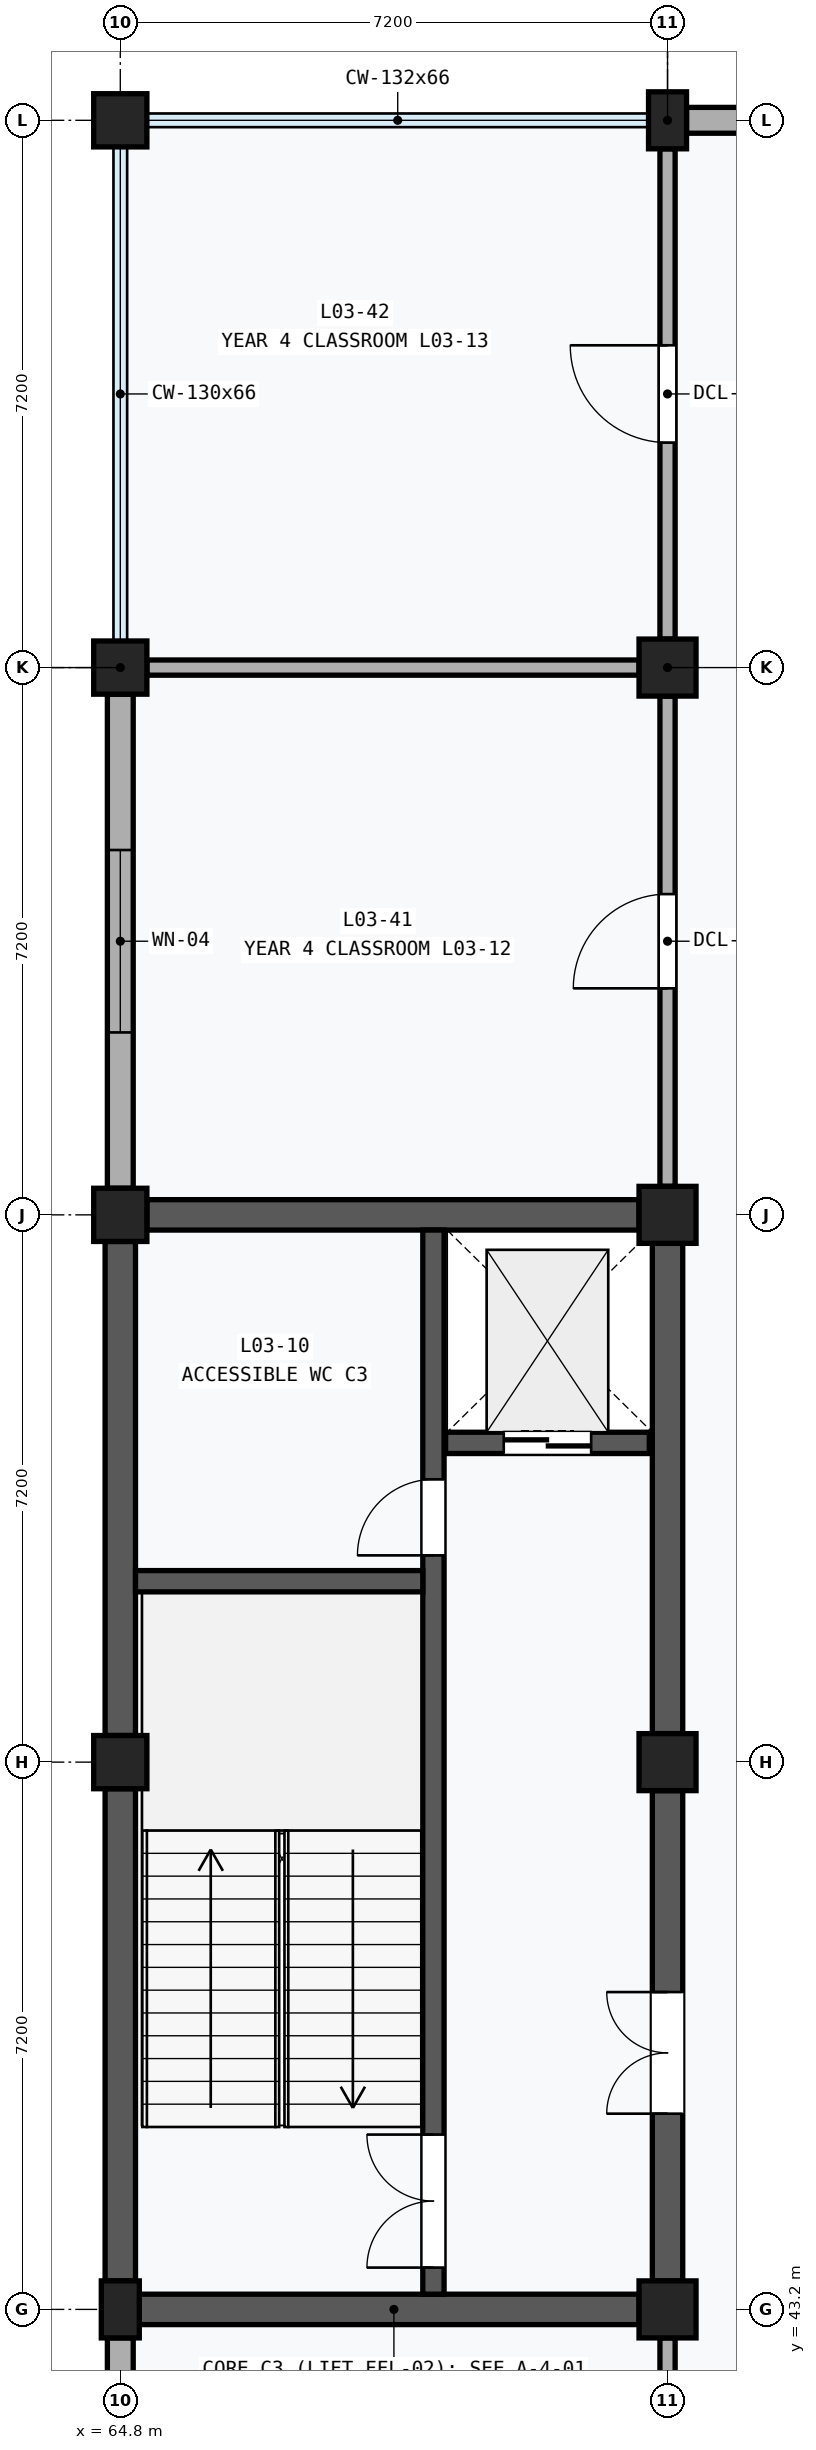
"""IFC4 building model, lengths in metres.
Left out: names, types, materials, properties, quantities, classifications, styles, units other than length and angle.
Written with IfcOpenShell. Run it as: python <this file> out.ifc"""

import sys

from ifc_helpers import new_model, si_unit, direction, frame, frame_2d, origin, origin_2d, place, context, subcontext, project, spatial, rectangle, extrude, element, fill, save


model = new_model("IFC4")
c1 = context("Model", 3, precision=1e-05, world=origin(), true_north=direction((0.0, 1.0)))
c2 = subcontext(c1, "Body", "Model", "MODEL_VIEW")
j1 = project(units=[si_unit("LENGTHUNIT", "METRE"), si_unit("PLANEANGLEUNIT", "RADIAN")], contexts=[c1])
p1 = place(None, origin())
s1 = spatial("IfcSite", under=j1, at=p1, CompositionType="ELEMENT")
p2 = place(p1, origin())
s2 = spatial("IfcBuilding", under=s1, at=p2, CompositionType="ELEMENT")
p3 = place(p2, frame((0.0, 0.0, 14.4)))
s3 = spatial("IfcBuildingStorey", under=s2, at=p3, CompositionType="ELEMENT", Elevation=14.4)
p4 = place(p3, frame((64.8, 43.2, 0.0), z_axis=(0.0, 0.0, 1.0), x_axis=(1.0, 0.0, 0.0)))
e1 = element("IfcColumn", 1, at=p4, inside=s3, PredefinedType="PILASTER", context=c2, shape_type="SweptSolid", body=[
    extrude(rectangle(XDim=0.5, YDim=0.75, at=origin_2d()), origin(), (0.0, 0.0, 1.0), 4.2),
])
for number, where, z_axis, x_axis in (
    (2, (64.8, 50.4, 0.0), (0.0, 0.0, 1.0), (1.0, 0.0, 0.0)),
    (3, (64.8, 57.6, 0.0), (0.0, 0.0, 1.0), (1.0, 0.0, 0.0)),
    (4, (64.8, 64.8, 0.0), (0.0, 0.0, 1.0), (1.0, 0.0, 0.0)),
    (5, (64.8, 72.0, 0.0), (0.0, 0.0, 1.0), (1.0, 0.0, 0.0)),
):
    element("IfcColumn", number, at=place(p3, frame(where, z_axis=z_axis, x_axis=x_axis)), inside=s3, PredefinedType="COLUMN", context=c2, shape_type="SweptSolid", body=[
        extrude(rectangle(XDim=0.7, YDim=0.7, at=origin_2d()), origin(), (0.0, 0.0, 1.0), 4.2),
    ])
for number, where, z_axis, x_axis in (
    (6, (72.0, 43.2, 0.0), (0.0, 0.0, 1.0), (1.0, 0.0, 0.0)),
    (7, (72.0, 50.4, 0.0), (0.0, 0.0, 1.0), (1.0, 0.0, 0.0)),
    (8, (72.0, 57.6, 0.0), (0.0, 0.0, 1.0), (1.0, 0.0, 0.0)),
    (9, (72.0, 64.8, 0.0), (0.0, 0.0, 1.0), (1.0, 0.0, 0.0)),
):
    element("IfcColumn", number, at=place(p3, frame(where, z_axis=z_axis, x_axis=x_axis)), inside=s3, PredefinedType="COLUMN", context=c2, shape_type="SweptSolid", body=[
        extrude(rectangle(XDim=0.75, YDim=0.75, at=origin_2d()), origin(), (0.0, 0.0, 1.0), 4.2),
    ])
p5 = place(p3, frame((72.0, 72.0, 0.0), z_axis=(0.0, 0.0, 1.0), x_axis=(1.0, 0.0, 0.0)))
e10 = element("IfcColumn", 10, at=p5, inside=s3, PredefinedType="PILASTER", context=c2, shape_type="SweptSolid", body=[
    extrude(rectangle(XDim=0.5, YDim=0.75, at=origin_2d()), origin(), (0.0, 0.0, 1.0), 4.2),
])
p6 = place(p3, frame((64.8, 36.35, 0.0), z_axis=(0.0, 0.0, 1.0), x_axis=(0.0, 1.0, 0.0)))
e11 = element("IfcWall", 11, at=p6, inside=s3, PredefinedType="SOLIDWALL", context=c2, shape_type="SweptSolid", body=[
    extrude(rectangle(XDim=6.475, YDim=0.34, at=frame_2d((3.237, 0.0))), origin(), (0.0, 0.0, 1.0), 3.31),
])
p7 = place(p6, frame((2.337, 0.0, 0.9)))
e12 = element("IfcOpeningElement", 12, at=p7, cuts=e11, PredefinedType="OPENING", context=c2, shape_type="SweptSolid", body=[
    extrude(rectangle(XDim=1.8, YDim=1.8, at=frame_2d((0.9, 0.9))), frame((0.0, 0.182, 0.0), z_axis=(0.0, -1.0, 0.0), x_axis=(1.0, 0.0, 0.0)), (0.0, 0.0, 1.0), 0.364),
])
p8 = place(p3, frame((64.8, 57.95, 0.0), z_axis=(0.0, 0.0, 1.0), x_axis=(0.0, 1.0, 0.0)))
e13 = element("IfcWall", 13, at=p8, inside=s3, PredefinedType="SOLIDWALL", context=c2, shape_type="SweptSolid", body=[
    extrude(rectangle(XDim=6.5, YDim=0.34, at=frame_2d((3.25, 0.0))), origin(), (0.0, 0.0, 1.0), 3.31),
])
p9 = place(p8, frame((2.05, 0.0, 0.9)))
e14 = element("IfcOpeningElement", 14, at=p9, cuts=e13, PredefinedType="OPENING", context=c2, shape_type="SweptSolid", body=[
    extrude(rectangle(XDim=2.4, YDim=1.8, at=frame_2d((1.2, 0.9))), frame((0.0, 0.182, 0.0), z_axis=(0.0, -1.0, 0.0), x_axis=(1.0, 0.0, 0.0)), (0.0, 0.0, 1.0), 0.364),
])
p10 = place(p3, frame((72.25, 72.0, 0.0), z_axis=(0.0, 0.0, 1.0), x_axis=(1.0, 0.0, 0.0)))
e15 = element("IfcWall", 15, at=p10, inside=s3, PredefinedType="SOLIDWALL", context=c2, shape_type="SweptSolid", body=[
    extrude(rectangle(XDim=6.6, YDim=0.34, at=frame_2d((3.3, 0.0))), origin(), (0.0, 0.0, 1.0), 3.31),
])
p11 = place(p10, frame((1.8, 0.0, 0.9)))
e16 = element("IfcOpeningElement", 16, at=p11, cuts=e15, PredefinedType="OPENING", context=c2, shape_type="SweptSolid", body=[
    extrude(rectangle(XDim=3.0, YDim=1.8, at=frame_2d((1.5, 0.9))), frame((0.0, 0.182, 0.0), z_axis=(0.0, -1.0, 0.0), x_axis=(1.0, 0.0, 0.0)), (0.0, 0.0, 1.0), 0.364),
])
p12 = place(p3, frame((64.8, 43.575, 0.0), z_axis=(0.0, 0.0, 1.0), x_axis=(0.0, 1.0, 0.0)))
e17 = element("IfcWall", 17, at=p12, inside=s3, PredefinedType="SHEAR", context=c2, shape_type="SweptSolid", body=[
    extrude(rectangle(XDim=6.475, YDim=0.4, at=frame_2d((3.238, 0.0))), origin(), (0.0, 0.0, 1.0), 3.31),
])
p13 = place(p3, frame((64.8, 50.75, 0.0), z_axis=(0.0, 0.0, 1.0), x_axis=(0.0, 1.0, 0.0)))
e18 = element("IfcWall", 18, at=p13, inside=s3, PredefinedType="SHEAR", context=c2, shape_type="SweptSolid", body=[
    extrude(rectangle(XDim=6.5, YDim=0.4, at=frame_2d((3.25, 0.0))), origin(), (0.0, 0.0, 1.0), 3.31),
])
p14 = place(p3, frame((72.0, 43.575, 0.0), z_axis=(0.0, 0.0, 1.0), x_axis=(0.0, 1.0, 0.0)))
e19 = element("IfcWall", 19, at=p14, inside=s3, PredefinedType="SHEAR", context=c2, shape_type="SweptSolid", body=[
    extrude(rectangle(XDim=6.45, YDim=0.4, at=frame_2d((3.225, 0.0))), origin(), (0.0, 0.0, 1.0), 3.17),
])
p15 = place(p14, frame((2.2, 0.0, 0.0)))
e20 = element("IfcOpeningElement", 20, at=p15, cuts=e19, PredefinedType="OPENING", context=c2, shape_type="SweptSolid", body=[
    extrude(rectangle(XDim=1.6, YDim=2.2, at=frame_2d((0.8, 1.1))), frame((0.0, 0.212, 0.0), z_axis=(0.0, -1.0, 0.0), x_axis=(1.0, 0.0, 0.0)), (0.0, 0.0, 1.0), 0.424),
])
p16 = place(p3, frame((72.0, 50.775, 0.0), z_axis=(0.0, 0.0, 1.0), x_axis=(0.0, 1.0, 0.0)))
e21 = element("IfcWall", 21, at=p16, inside=s3, PredefinedType="SHEAR", context=c2, shape_type="SweptSolid", body=[
    extrude(rectangle(XDim=6.45, YDim=0.4, at=frame_2d((3.225, 0.0))), origin(), (0.0, 0.0, 1.0), 3.17),
])
p17 = place(p3, frame((65.05, 43.2, 0.0), z_axis=(0.0, 0.0, 1.0), x_axis=(1.0, 0.0, 0.0)))
e22 = element("IfcWall", 22, at=p17, inside=s3, PredefinedType="SHEAR", context=c2, shape_type="SweptSolid", body=[
    extrude(rectangle(XDim=6.575, YDim=0.4, at=frame_2d((3.288, 0.0))), origin(), (0.0, 0.0, 1.0), 3.17),
])
p18 = place(p3, frame((65.15, 57.6, 0.0), z_axis=(0.0, 0.0, 1.0), x_axis=(1.0, 0.0, 0.0)))
e23 = element("IfcWall", 23, at=p18, inside=s3, PredefinedType="SHEAR", context=c2, shape_type="SweptSolid", body=[
    extrude(rectangle(XDim=6.475, YDim=0.4, at=frame_2d((3.238, 0.0))), origin(), (0.0, 0.0, 1.0), 3.17),
])
p19 = place(p3, frame((68.92, 43.4, 0.0), z_axis=(0.0, 0.0, 1.0), x_axis=(0.0, 1.0, 0.0)))
e24 = element("IfcWall", 24, at=p19, inside=s3, PredefinedType="SHEAR", context=c2, shape_type="SweptSolid", body=[
    extrude(rectangle(XDim=14.0, YDim=0.28, at=frame_2d((7.0, 0.0))), origin(), (0.0, 0.0, 1.0), 3.94),
])
p20 = place(p19, frame((0.35, 0.0, 0.0)))
e25 = element("IfcOpeningElement", 25, at=p20, cuts=e24, PredefinedType="OPENING", context=c2, shape_type="SweptSolid", body=[
    extrude(rectangle(XDim=1.75, YDim=2.15, at=frame_2d((0.875, 1.075))), frame((0.0, 0.152, 0.0), z_axis=(0.0, -1.0, 0.0), x_axis=(1.0, 0.0, 0.0)), (0.0, 0.0, 1.0), 0.304),
])
p21 = place(p19, frame((9.72, 0.0, 0.0)))
e26 = element("IfcOpeningElement", 26, at=p21, cuts=e24, PredefinedType="OPENING", context=c2, shape_type="SweptSolid", body=[
    extrude(rectangle(XDim=1.0, YDim=2.15, at=frame_2d((0.5, 1.075))), frame((0.0, 0.152, 0.0), z_axis=(0.0, -1.0, 0.0), x_axis=(1.0, 0.0, 0.0)), (0.0, 0.0, 1.0), 0.304),
])
p22 = place(p3, frame((65.0, 52.78, 0.0), z_axis=(0.0, 0.0, 1.0), x_axis=(1.0, 0.0, 0.0)))
e27 = element("IfcWall", 27, at=p22, inside=s3, PredefinedType="SHEAR", context=c2, shape_type="SweptSolid", body=[
    extrude(rectangle(XDim=3.78, YDim=0.28, at=frame_2d((1.89, 0.0))), origin(), (0.0, 0.0, 1.0), 3.94),
])
p23 = place(p3, frame((69.08, 54.6, 0.0), z_axis=(0.0, 0.0, 1.0), x_axis=(1.0, 0.0, 0.0)))
e28 = element("IfcWall", 28, at=p23, inside=s3, PredefinedType="SHEAR", context=c2, shape_type="SweptSolid", body=[
    extrude(rectangle(XDim=2.68, YDim=0.28, at=frame_2d((1.34, 0.0))), origin(), (0.0, 0.0, 1.0), 3.94),
])
p24 = place(p23, frame((0.765, 0.0, 0.0)))
e29 = element("IfcOpeningElement", 29, at=p24, cuts=e28, PredefinedType="OPENING", context=c2, shape_type="SweptSolid", body=[
    extrude(rectangle(XDim=1.15, YDim=2.2, at=frame_2d((0.575, 1.1))), frame((0.0, 0.152, 0.0), z_axis=(0.0, -1.0, 0.0), x_axis=(1.0, 0.0, 0.0)), (0.0, 0.0, 1.0), 0.304),
])
p25 = place(p3, frame((72.0, 36.375, 0.0), z_axis=(0.0, 0.0, 1.0), x_axis=(0.0, 1.0, 0.0)))
e30 = element("IfcWall", 30, at=p25, inside=s3, PredefinedType="PARTITIONING", context=c2, shape_type="SweptSolid", body=[
    extrude(rectangle(XDim=6.45, YDim=0.2, at=frame_2d((3.225, 0.0))), origin(), (0.0, 0.0, 1.0), 3.17),
])
p26 = place(p25, frame((2.625, 0.0, 0.0)))
e31 = element("IfcOpeningElement", 31, at=p26, cuts=e30, PredefinedType="OPENING", context=c2, shape_type="SweptSolid", body=[
    extrude(rectangle(XDim=1.2, YDim=2.24, at=frame_2d((0.6, 1.12))), frame((0.0, 0.112, 0.0), z_axis=(0.0, -1.0, 0.0), x_axis=(1.0, 0.0, 0.0)), (0.0, 0.0, 1.0), 0.224),
])
p27 = place(p3, frame((65.15, 64.8, 0.0), z_axis=(0.0, 0.0, 1.0), x_axis=(1.0, 0.0, 0.0)))
e32 = element("IfcWall", 32, at=p27, inside=s3, PredefinedType="PARTITIONING", context=c2, shape_type="SweptSolid", body=[
    extrude(rectangle(XDim=6.475, YDim=0.2, at=frame_2d((3.238, 0.0))), origin(), (0.0, 0.0, 1.0), 3.17),
])
p28 = place(p3, frame((72.0, 57.975, 0.0), z_axis=(0.0, 0.0, 1.0), x_axis=(0.0, 1.0, 0.0)))
e33 = element("IfcWall", 33, at=p28, inside=s3, PredefinedType="PARTITIONING", context=c2, shape_type="SweptSolid", body=[
    extrude(rectangle(XDim=6.45, YDim=0.2, at=frame_2d((3.225, 0.0))), origin(), (0.0, 0.0, 1.0), 3.17),
])
p29 = place(p28, frame((2.605, 0.0, 0.0)))
e34 = element("IfcOpeningElement", 34, at=p29, cuts=e33, PredefinedType="OPENING", context=c2, shape_type="SweptSolid", body=[
    extrude(rectangle(XDim=1.24, YDim=2.26, at=frame_2d((0.62, 1.13))), frame((0.0, 0.112, 0.0), z_axis=(0.0, -1.0, 0.0), x_axis=(1.0, 0.0, 0.0)), (0.0, 0.0, 1.0), 0.224),
])
p30 = place(p3, frame((72.0, 65.175, 0.0), z_axis=(0.0, 0.0, 1.0), x_axis=(0.0, 1.0, 0.0)))
e35 = element("IfcWall", 35, at=p30, inside=s3, PredefinedType="PARTITIONING", context=c2, shape_type="SweptSolid", body=[
    extrude(rectangle(XDim=6.45, YDim=0.2, at=frame_2d((3.225, 0.0))), origin(), (0.0, 0.0, 1.0), 3.17),
])
p31 = place(p30, frame((2.585, 0.0, 0.0)))
e36 = element("IfcOpeningElement", 36, at=p31, cuts=e35, PredefinedType="OPENING", context=c2, shape_type="SweptSolid", body=[
    extrude(rectangle(XDim=1.28, YDim=2.28, at=frame_2d((0.64, 1.14))), frame((0.0, 0.112, 0.0), z_axis=(0.0, -1.0, 0.0), x_axis=(1.0, 0.0, 0.0)), (0.0, 0.0, 1.0), 0.224),
])
p32 = place(p9, origin())
e37 = element("IfcWindow", 37, at=p32, inside=s3, PartitioningType="SINGLE_PANEL", PredefinedType="WINDOW", context=c2, shape_type="SweptSolid", body=[
    extrude(rectangle(XDim=2.4, YDim=1.8, at=frame_2d((1.2, 0.9))), frame((0.0, 0.03, 0.0), z_axis=(0.0, -1.0, 0.0), x_axis=(1.0, 0.0, 0.0)), (0.0, 0.0, 1.0), 0.06),
])
fill(e14, e37)
p33 = place(p15, origin())
e38 = element("IfcDoor", 38, at=p33, inside=s3, OperationType="DOUBLE_DOOR_SINGLE_SWING", PredefinedType="DOOR", context=c2, shape_type="SweptSolid", body=[
    extrude(rectangle(XDim=1.6, YDim=2.2, at=frame_2d((0.8, 1.1))), frame((0.0, 0.025, 0.0), z_axis=(0.0, -1.0, 0.0), x_axis=(1.0, 0.0, 0.0)), (0.0, 0.0, 1.0), 0.05),
])
fill(e20, e38)
p34 = place(p20, origin())
e39 = element("IfcDoor", 39, at=p34, inside=s3, OperationType="DOUBLE_DOOR_SINGLE_SWING", PredefinedType="DOOR", context=c2, shape_type="SweptSolid", body=[
    extrude(rectangle(XDim=1.75, YDim=2.15, at=frame_2d((0.875, 1.075))), frame((0.0, 0.025, 0.0), z_axis=(0.0, -1.0, 0.0), x_axis=(1.0, 0.0, 0.0)), (0.0, 0.0, 1.0), 0.05),
])
fill(e25, e39)
p35 = place(p21, origin())
e40 = element("IfcDoor", 40, at=p35, inside=s3, OperationType="SINGLE_SWING_LEFT", PredefinedType="DOOR", context=c2, shape_type="SweptSolid", body=[
    extrude(rectangle(XDim=1.0, YDim=2.15, at=frame_2d((0.5, 1.075))), frame((0.0, 0.025, 0.0), z_axis=(0.0, -1.0, 0.0), x_axis=(1.0, 0.0, 0.0)), (0.0, 0.0, 1.0), 0.05),
])
fill(e26, e40)
p36 = place(p24, frame((1.15, 0.0, 0.0), z_axis=(0.0, 0.0, 1.0), x_axis=(-1.0, 0.0, 0.0)))
e41 = element("IfcDoor", 41, at=p36, inside=s3, OperationType="DOUBLE_DOOR_SLIDING", PredefinedType="DOOR", context=c2, shape_type="SweptSolid", body=[
    extrude(rectangle(XDim=1.15, YDim=2.2, at=frame_2d((0.575, 1.1))), frame((0.0, 0.025, 0.0), z_axis=(0.0, -1.0, 0.0), x_axis=(1.0, 0.0, 0.0)), (0.0, 0.0, 1.0), 0.05),
])
fill(e29, e41)
p37 = place(p29, origin())
e42 = element("IfcDoor", 42, at=p37, inside=s3, OperationType="SINGLE_SWING_LEFT", PredefinedType="DOOR", context=c2, shape_type="SweptSolid", body=[
    extrude(rectangle(XDim=1.24, YDim=2.26, at=frame_2d((0.62, 1.13))), frame((0.0, 0.025, 0.0), z_axis=(0.0, -1.0, 0.0), x_axis=(1.0, 0.0, 0.0)), (0.0, 0.0, 1.0), 0.05),
])
fill(e34, e42)
p38 = place(p31, origin())
e43 = element("IfcDoor", 43, at=p38, inside=s3, OperationType="SINGLE_SWING_RIGHT", PredefinedType="DOOR", context=c2, shape_type="SweptSolid", body=[
    extrude(rectangle(XDim=1.28, YDim=2.28, at=frame_2d((0.64, 1.14))), frame((0.0, 0.025, 0.0), z_axis=(0.0, -1.0, 0.0), x_axis=(1.0, 0.0, 0.0)), (0.0, 0.0, 1.0), 0.05),
])
fill(e36, e43)
save(model, sys.argv[1])
